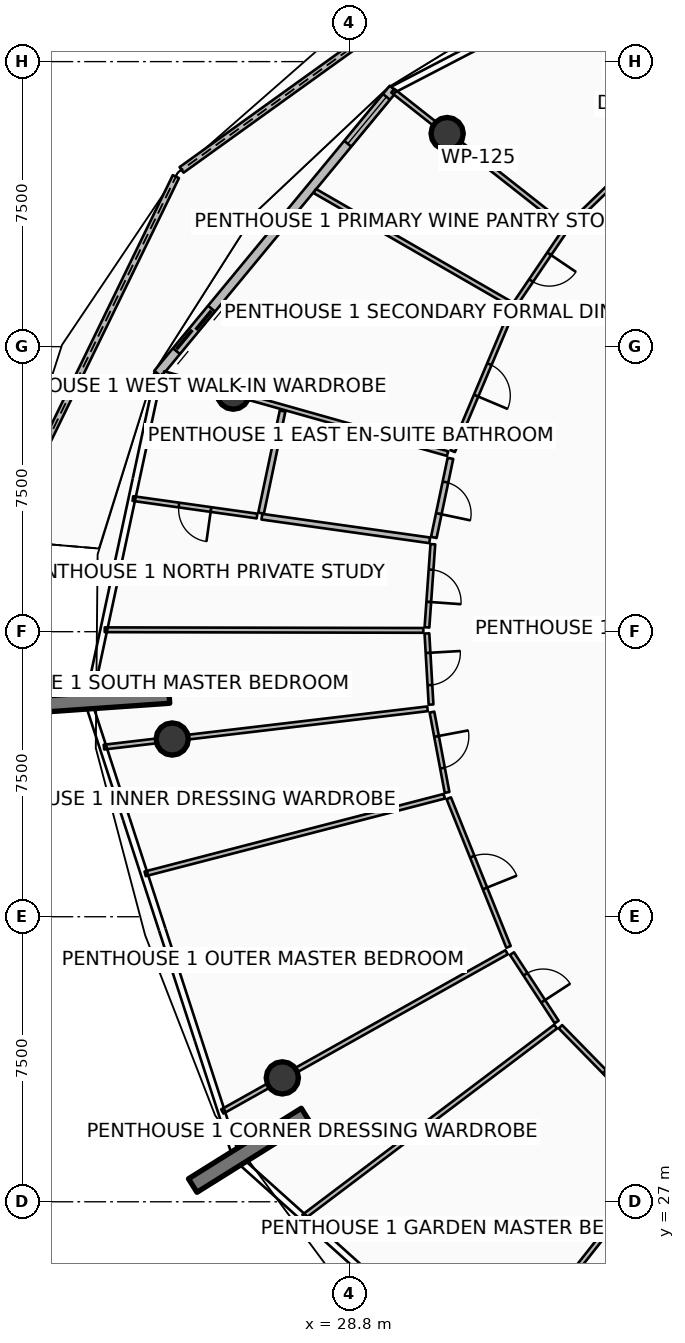
"""IFC4 building model, lengths in metres.
Left out: names, types, materials, properties, quantities, classifications, styles, units other than length and angle.
Written with IfcOpenShell. Run it as: python <this file> out.ifc"""

import sys

from ifc_helpers import new_model, si_unit, direction, frame, frame_2d, origin, origin_2d, place, context, subcontext, project, spatial, polyline, rectangle, circle, outline, extrude, element, fill, save


model = new_model("IFC4")
c1 = context("Model", 3, precision=1e-05, world=origin(), true_north=direction((0.0, 1.0)))
c2 = subcontext(c1, "Body", "Model", "MODEL_VIEW")
j1 = project(units=[si_unit("LENGTHUNIT", "METRE"), si_unit("PLANEANGLEUNIT", "RADIAN")], contexts=[c1])
p1 = place(None, origin())
s1 = spatial("IfcSite", under=j1, at=p1, CompositionType="ELEMENT")
p2 = place(p1, origin())
s2 = spatial("IfcBuilding", under=s1, at=p2, CompositionType="ELEMENT")
p3 = place(p2, frame((0.0, 0.0, 322.1)))
s3 = spatial("IfcBuildingStorey", under=s2, at=p3, CompositionType="ELEMENT", Elevation=322.1)
for number, where, z_axis, x_axis in (
    (1, (24.059, 40.326, 0.0), (0.0, 0.0, 1.0), (-0.998, -0.07, 0.0)),
    (2, (27.647, 29.282, 0.0), (0.0, 0.0, 1.0), (-0.848, -0.53, 0.0)),
):
    element("IfcWall", number, at=place(p3, frame(where, z_axis=z_axis, x_axis=x_axis)), inside=s3, PredefinedType="SOLIDWALL", context=c2, shape_type="SweptSolid", body=[
        extrude(rectangle(XDim=3.5, YDim=0.42, at=frame_2d((1.75, 0.0))), origin(), (0.0, 0.0, 1.0), 4.2),
    ])
for number, where, z_axis, x_axis in (
    (3, (31.374, 55.107, 0.0), (0.0, 0.0, 1.0), (1.0, 0.0, 0.0)),
    (4, (25.744, 48.277, 0.0), (0.0, 0.0, 1.0), (1.0, 0.0, 0.0)),
    (5, (24.14, 39.176, 0.0), (0.0, 0.0, 1.0), (1.0, 0.0, 0.0)),
    (6, (27.037, 30.26, 0.0), (0.0, 0.0, 1.0), (1.0, 0.0, 0.0)),
):
    element("IfcColumn", number, at=place(p3, frame(where, z_axis=z_axis, x_axis=x_axis)), inside=s3, PredefinedType="COLUMN", context=c2, shape_type="SweptSolid", body=[
        extrude(circle(Radius=0.425, at=origin_2d()), origin(), (0.0, 0.0, 1.0), 3.94),
    ])
p4 = place(p3, frame((32.469, 59.961, 0.0), z_axis=(0.0, 0.0, 1.0), x_axis=(-0.812019730163, -0.583629983659, 0.0)))
e7 = element("IfcWall", 7, at=p4, inside=s3, PredefinedType="PARAPET", context=c2, shape_type="SweptSolid", body=[
    extrude(outline(polyline([(0.0, 0.0), (9.954, 0.0), (9.954, 1.632), (4.977, 1.418), (0.0, 1.233), (0.0, 0.0)])), frame((0.0, 0.09, 0.0), z_axis=(0.0, -1.0, 0.0), x_axis=(1.0, 0.0, 0.0)), (0.0, 0.0, 1.0), 0.18),
])
p5 = place(p3, frame((24.236, 53.974, 0.0), z_axis=(0.0, 0.0, 1.0), x_axis=(-0.437628769895, -0.899155748333, 0.0)))
e8 = element("IfcWall", 8, at=p5, inside=s3, PredefinedType="PARAPET", context=c2, shape_type="SweptSolid", body=[
    extrude(outline(polyline([(0.0, 0.0), (10.635, 0.0), (10.635, 1.86), (5.317, 1.798), (0.0, 1.632), (0.0, 0.0)])), frame((0.0, 0.09, 0.0), z_axis=(0.0, -1.0, 0.0), x_axis=(1.0, 0.0, 0.0)), (0.0, 0.0, 1.0), 0.18),
])
p6 = place(p3, frame((29.955, 56.289, 0.0), z_axis=(0.0, 0.0, 1.0), x_axis=(-0.636803612721, -0.771026042897, 0.0)))
e9 = element("IfcWall", 9, at=p6, inside=s3, PredefinedType="SOLIDWALL", context=c2, shape_type="SweptSolid", body=[
    extrude(rectangle(XDim=9.728, YDim=0.24, at=frame_2d((4.864, 0.0))), origin(), (0.0, 0.0, 1.0), 2.89),
])
p7 = place(p6, frame((7.508, 0.0, 0.0)))
e10 = element("IfcOpeningElement", 10, at=p7, cuts=e9, PredefinedType="OPENING", context=c2, shape_type="SweptSolid", body=[
    extrude(rectangle(XDim=1.45, YDim=2.15, at=frame_2d((0.725, 1.075))), frame((0.0, 0.13, 0.0), z_axis=(0.0, -1.0, 0.0), x_axis=(1.0, 0.0, 0.0)), (0.0, 0.0, 1.0), 0.26),
])
p8 = place(p6, frame((0.28, 0.0, 0.65)))
e11 = element("IfcOpeningElement", 11, at=p8, cuts=e9, PredefinedType="OPENING", context=c2, shape_type="SweptSolid", body=[
    extrude(rectangle(XDim=1.6, YDim=1.5, at=frame_2d((0.8, 0.75))), frame((0.0, 0.13, 0.0), z_axis=(0.0, -1.0, 0.0), x_axis=(1.0, 0.0, 0.0)), (0.0, 0.0, 1.0), 0.26),
])
p9 = place(p3, frame((37.76, 55.886, 0.0), z_axis=(0.0, 0.0, 1.0), x_axis=(-0.593476725003, 0.804851152002, 0.0)))
e12 = element("IfcWall", 12, at=p9, inside=s3, PredefinedType="PARTITIONING", context=c2, shape_type="SweptSolid", body=[
    extrude(rectangle(XDim=3.958, YDim=0.15, at=frame_2d((1.979, 0.0))), origin(), (0.0, 0.0, 1.0), 3.38),
])
p10 = place(p3, frame((37.749, 55.751, 0.0), z_axis=(0.0, 0.0, 1.0), x_axis=(-0.718380815069, -0.695650058967, 0.0)))
e13 = element("IfcWall", 13, at=p10, inside=s3, PredefinedType="PARTITIONING", context=c2, shape_type="SweptSolid", body=[
    extrude(rectangle(XDim=4.393, YDim=0.125, at=frame_2d((2.196, 0.0))), origin(), (0.0, 0.0, 1.0), 3.38),
])
p11 = place(p10, frame((1.746, 0.0, 0.0)))
e14 = element("IfcOpeningElement", 14, at=p11, cuts=e13, PredefinedType="OPENING", context=c2, shape_type="SweptSolid", body=[
    extrude(rectangle(XDim=0.9, YDim=2.08, at=frame_2d((0.45, 1.04))), frame((0.0, 0.073, 0.0), z_axis=(0.0, -1.0, 0.0), x_axis=(1.0, 0.0, 0.0)), (0.0, 0.0, 1.0), 0.145),
])
p12 = place(p3, frame((34.443, 52.688, 0.0), z_axis=(0.0, 0.0, 1.0), x_axis=(-0.785329715116, 0.61907773224, 0.0)))
e15 = element("IfcWall", 15, at=p12, inside=s3, PredefinedType="PARTITIONING", context=c2, shape_type="SweptSolid", body=[
    extrude(rectangle(XDim=5.73, YDim=0.125, at=frame_2d((2.865, 0.0))), origin(), (0.0, 0.0, 1.0), 3.38),
])
p13 = place(p3, frame((33.054, 50.619, 0.0), z_axis=(0.0, 0.0, 1.0), x_axis=(-0.86627763932, 0.499562860524, 0.0)))
e16 = element("IfcWall", 16, at=p13, inside=s3, PredefinedType="PARTITIONING", context=c2, shape_type="SweptSolid", body=[
    extrude(rectangle(XDim=5.96, YDim=0.125, at=frame_2d((2.98, 0.0))), origin(), (0.0, 0.0, 1.0), 3.38),
])
p14 = place(p3, frame((34.466, 52.543, 0.0), z_axis=(0.0, 0.0, 1.0), x_axis=(-0.560789421623, -0.827958467917, 0.0)))
e17 = element("IfcWall", 17, at=p14, inside=s3, PredefinedType="PARTITIONING", context=c2, shape_type="SweptSolid", body=[
    extrude(rectangle(XDim=2.298, YDim=0.125, at=frame_2d((1.149, 0.0))), origin(), (0.0, 0.0, 1.0), 3.38),
])
p15 = place(p14, frame((0.724, 0.0, 0.0)))
e18 = element("IfcOpeningElement", 18, at=p15, cuts=e17, PredefinedType="OPENING", context=c2, shape_type="SweptSolid", body=[
    extrude(rectangle(XDim=0.85, YDim=2.06, at=frame_2d((0.425, 1.03))), frame((0.0, 0.073, 0.0), z_axis=(0.0, -1.0, 0.0), x_axis=(1.0, 0.0, 0.0)), (0.0, 0.0, 1.0), 0.145),
])
p16 = place(p3, frame((33.101, 50.5, 0.0), z_axis=(0.0, 0.0, 1.0), x_axis=(-0.388459336045, -0.921465867105, 0.0)))
e19 = element("IfcWall", 19, at=p16, inside=s3, PredefinedType="PARTITIONING", context=c2, shape_type="SweptSolid", body=[
    extrude(rectangle(XDim=4.069, YDim=0.125, at=frame_2d((2.034, 0.0))), origin(), (0.0, 0.0, 1.0), 3.38),
])
p17 = place(p16, frame((1.584, 0.0, 0.0)))
e20 = element("IfcOpeningElement", 20, at=p17, cuts=e19, PredefinedType="OPENING", context=c2, shape_type="SweptSolid", body=[
    extrude(rectangle(XDim=0.9, YDim=2.08, at=frame_2d((0.45, 1.04))), frame((0.0, 0.073, 0.0), z_axis=(0.0, -1.0, 0.0), x_axis=(1.0, 0.0, 0.0)), (0.0, 0.0, 1.0), 0.145),
])
p18 = place(p3, frame((31.385, 46.686, 0.0), z_axis=(0.0, 0.0, 1.0), x_axis=(-0.962455784847, 0.271438505401, 0.0)))
e21 = element("IfcWall", 21, at=p18, inside=s3, PredefinedType="PARTITIONING", context=c2, shape_type="SweptSolid", body=[
    extrude(rectangle(XDim=7.764, YDim=0.125, at=frame_2d((3.882, 0.0))), origin(), (0.0, 0.0, 1.0), 3.38),
])
p19 = place(p3, frame((31.461, 46.561, 0.0), z_axis=(0.0, 0.0, 1.0), x_axis=(-0.20584268828, -0.978585094758, 0.0)))
e22 = element("IfcWall", 22, at=p19, inside=s3, PredefinedType="PARTITIONING", context=c2, shape_type="SweptSolid", body=[
    extrude(rectangle(XDim=2.127, YDim=0.15, at=frame_2d((1.063, 0.0))), origin(), (0.0, 0.0, 1.0), 3.38),
])
p20 = place(p19, frame((0.638, 0.0, 0.0)))
e23 = element("IfcOpeningElement", 23, at=p20, cuts=e22, PredefinedType="OPENING", context=c2, shape_type="SweptSolid", body=[
    extrude(rectangle(XDim=0.85, YDim=2.06, at=frame_2d((0.425, 1.03))), frame((0.0, 0.085, 0.0), z_axis=(0.0, -1.0, 0.0), x_axis=(1.0, 0.0, 0.0)), (0.0, 0.0, 1.0), 0.17),
])
p21 = place(p3, frame((27.043, 47.807, 0.0), z_axis=(0.0, 0.0, 1.0), x_axis=(-0.205902945386, -0.978572417903, 0.0)))
e24 = element("IfcWall", 24, at=p21, inside=s3, PredefinedType="PARTITIONING", context=c2, shape_type="SweptSolid", body=[
    extrude(rectangle(XDim=2.746, YDim=0.15, at=frame_2d((1.373, 0.0))), origin(), (0.0, 0.0, 1.0), 3.38),
])
p22 = place(p3, frame((30.915, 44.404, 0.0), z_axis=(0.0, 0.0, 1.0), x_axis=(-0.990240767804, 0.139367219172, 0.0)))
e25 = element("IfcWall", 25, at=p22, inside=s3, PredefinedType="PARTITIONING", context=c2, shape_type="SweptSolid", body=[
    extrude(rectangle(XDim=4.46, YDim=0.15, at=frame_2d((2.23, 0.0))), origin(), (0.0, 0.0, 1.0), 3.38),
])
p23 = place(p3, frame((26.37, 45.044, 0.0), z_axis=(0.0, 0.0, 1.0), x_axis=(-0.990243492516, 0.139347858002, 0.0)))
e26 = element("IfcWall", 26, at=p23, inside=s3, PredefinedType="PARTITIONING", context=c2, shape_type="SweptSolid", body=[
    extrude(rectangle(XDim=3.297, YDim=0.125, at=frame_2d((1.649, 0.0))), origin(), (0.0, 0.0, 1.0), 3.38),
])
p24 = place(p23, frame((1.224, 0.0, 0.0)))
e27 = element("IfcOpeningElement", 27, at=p24, cuts=e26, PredefinedType="OPENING", context=c2, shape_type="SweptSolid", body=[
    extrude(rectangle(XDim=0.85, YDim=2.06, at=frame_2d((0.425, 1.03))), frame((0.0, 0.073, 0.0), z_axis=(0.0, -1.0, 0.0), x_axis=(1.0, 0.0, 0.0)), (0.0, 0.0, 1.0), 0.145),
])
p25 = place(p3, frame((30.747, 42.034, 0.0), z_axis=(0.0, 0.0, 1.0), x_axis=(-0.999998039071, 0.001980367145, 0.0)))
e28 = element("IfcWall", 28, at=p25, inside=s3, PredefinedType="PARTITIONING", context=c2, shape_type="SweptSolid", body=[
    extrude(rectangle(XDim=8.383, YDim=0.125, at=frame_2d((4.191, 0.0))), origin(), (0.0, 0.0, 1.0), 3.38),
])
p26 = place(p3, frame((30.998, 44.302, 0.0), z_axis=(0.0, 0.0, 1.0), x_axis=(-0.070788273512, -0.997491363538, 0.0)))
e29 = element("IfcWall", 29, at=p26, inside=s3, PredefinedType="PARTITIONING", context=c2, shape_type="SweptSolid", body=[
    extrude(rectangle(XDim=2.194, YDim=0.125, at=frame_2d((1.097, 0.0))), origin(), (0.0, 0.0, 1.0), 3.38),
])
p27 = place(p26, frame((0.672, 0.0, 0.0)))
e30 = element("IfcOpeningElement", 30, at=p27, cuts=e29, PredefinedType="OPENING", context=c2, shape_type="SweptSolid", body=[
    extrude(rectangle(XDim=0.85, YDim=2.06, at=frame_2d((0.425, 1.03))), frame((0.0, 0.073, 0.0), z_axis=(0.0, -1.0, 0.0), x_axis=(1.0, 0.0, 0.0)), (0.0, 0.0, 1.0), 0.145),
])
p28 = place(p3, frame((30.842, 41.954, 0.0), z_axis=(0.0, 0.0, 1.0), x_axis=(0.057950971365, -0.998319430302, 0.0)))
e31 = element("IfcWall", 31, at=p28, inside=s3, PredefinedType="PARTITIONING", context=c2, shape_type="SweptSolid", body=[
    extrude(rectangle(XDim=1.875, YDim=0.125, at=frame_2d((0.938, 0.0))), origin(), (0.0, 0.0, 1.0), 3.38),
])
p29 = place(p28, frame((0.512, 0.0, 0.0)))
e32 = element("IfcOpeningElement", 32, at=p29, cuts=e31, PredefinedType="OPENING", context=c2, shape_type="SweptSolid", body=[
    extrude(rectangle(XDim=0.85, YDim=2.06, at=frame_2d((0.425, 1.03))), frame((0.0, 0.073, 0.0), z_axis=(0.0, -1.0, 0.0), x_axis=(1.0, 0.0, 0.0)), (0.0, 0.0, 1.0), 0.145),
])
p30 = place(p3, frame((30.857, 39.971, 0.0), z_axis=(0.0, 0.0, 1.0), x_axis=(-0.993069304007, -0.117530240533, 0.0)))
e33 = element("IfcWall", 33, at=p30, inside=s3, PredefinedType="PARTITIONING", context=c2, shape_type="SweptSolid", body=[
    extrude(rectangle(XDim=8.573, YDim=0.125, at=frame_2d((4.286, 0.0))), origin(), (0.0, 0.0, 1.0), 3.38),
])
p31 = place(p3, frame((31.299, 37.67, 0.0), z_axis=(0.0, 0.0, 1.0), x_axis=(-0.967993656755, -0.250974661037, 0.0)))
e34 = element("IfcWall", 34, at=p31, inside=s3, PredefinedType="PARTITIONING", context=c2, shape_type="SweptSolid", body=[
    extrude(rectangle(XDim=8.132, YDim=0.125, at=frame_2d((4.066, 0.0))), origin(), (0.0, 0.0, 1.0), 3.38),
])
p32 = place(p3, frame((30.975, 39.885, 0.0), z_axis=(0.0, 0.0, 1.0), x_axis=(0.184617579239, -0.982810434131, 0.0)))
e35 = element("IfcWall", 35, at=p32, inside=s3, PredefinedType="PARTITIONING", context=c2, shape_type="SweptSolid", body=[
    extrude(rectangle(XDim=2.15, YDim=0.125, at=frame_2d((1.075, 0.0))), origin(), (0.0, 0.0, 1.0), 3.38),
])
p33 = place(p32, frame((0.65, 0.0, 0.0)))
e36 = element("IfcOpeningElement", 36, at=p33, cuts=e35, PredefinedType="OPENING", context=c2, shape_type="SweptSolid", body=[
    extrude(rectangle(XDim=0.85, YDim=2.06, at=frame_2d((0.425, 1.03))), frame((0.0, 0.073, 0.0), z_axis=(0.0, -1.0, 0.0), x_axis=(1.0, 0.0, 0.0)), (0.0, 0.0, 1.0), 0.145),
])
p34 = place(p3, frame((31.416, 37.618, 0.0), z_axis=(0.0, 0.0, 1.0), x_axis=(0.37287786912, -0.927880431263, 0.0)))
e37 = element("IfcWall", 37, at=p34, inside=s3, PredefinedType="PARTITIONING", context=c2, shape_type="SweptSolid", body=[
    extrude(rectangle(XDim=4.216, YDim=0.125, at=frame_2d((2.108, 0.0))), origin(), (0.0, 0.0, 1.0), 3.38),
])
p35 = place(p34, frame((1.658, 0.0, 0.0)))
e38 = element("IfcOpeningElement", 38, at=p35, cuts=e37, PredefinedType="OPENING", context=c2, shape_type="SweptSolid", body=[
    extrude(rectangle(XDim=0.9, YDim=2.08, at=frame_2d((0.45, 1.04))), frame((0.0, 0.073, 0.0), z_axis=(0.0, -1.0, 0.0), x_axis=(1.0, 0.0, 0.0)), (0.0, 0.0, 1.0), 0.145),
])
p36 = place(p3, frame((32.938, 33.565, 0.0), z_axis=(0.0, 0.0, 1.0), x_axis=(-0.87250261652, -0.488609439293, 0.0)))
e39 = element("IfcWall", 39, at=p36, inside=s3, PredefinedType="PARTITIONING", context=c2, shape_type="SweptSolid", body=[
    extrude(rectangle(XDim=8.573, YDim=0.125, at=frame_2d((4.286, 0.0))), origin(), (0.0, 0.0, 1.0), 3.38),
])
p37 = place(p3, frame((37.312, 28.443, 0.0), z_axis=(0.0, 0.0, 1.0), x_axis=(-0.619079427556, -0.78532837869, 0.0)))
e40 = element("IfcWall", 40, at=p37, inside=s3, PredefinedType="PARTITIONING", context=c2, shape_type="SweptSolid", body=[
    extrude(rectangle(XDim=7.864, YDim=0.125, at=frame_2d((3.932, 0.0))), origin(), (0.0, 0.0, 1.0), 3.38),
])
p38 = place(p3, frame((34.228, 31.608, 0.0), z_axis=(0.0, 0.0, 1.0), x_axis=(-0.798277484709, -0.602289845014, 0.0)))
e41 = element("IfcWall", 41, at=p38, inside=s3, PredefinedType="PARTITIONING", context=c2, shape_type="SweptSolid", body=[
    extrude(rectangle(XDim=8.299, YDim=0.125, at=frame_2d((4.149, 0.0))), origin(), (0.0, 0.0, 1.0), 3.38),
])
p39 = place(p3, frame((33.08, 33.53, 0.0), z_axis=(0.0, 0.0, 1.0), x_axis=(0.546735291737, -0.837305512205, 0.0)))
e42 = element("IfcWall", 42, at=p39, inside=s3, PredefinedType="PARTITIONING", context=c2, shape_type="SweptSolid", body=[
    extrude(rectangle(XDim=2.15, YDim=0.125, at=frame_2d((1.075, 0.0))), origin(), (0.0, 0.0, 1.0), 3.38),
])
p40 = place(p39, frame((0.65, 0.0, 0.0)))
e43 = element("IfcOpeningElement", 43, at=p40, cuts=e42, PredefinedType="OPENING", context=c2, shape_type="SweptSolid", body=[
    extrude(rectangle(XDim=0.85, YDim=2.06, at=frame_2d((0.425, 1.03))), frame((0.0, 0.073, 0.0), z_axis=(0.0, -1.0, 0.0), x_axis=(1.0, 0.0, 0.0)), (0.0, 0.0, 1.0), 0.145),
])
p41 = place(p3, frame((34.355, 31.605, 0.0), z_axis=(0.0, 0.0, 1.0), x_axis=(0.699567507915, -0.714566513258, 0.0)))
e44 = element("IfcWall", 44, at=p41, inside=s3, PredefinedType="PARTITIONING", context=c2, shape_type="SweptSolid", body=[
    extrude(rectangle(XDim=4.216, YDim=0.125, at=frame_2d((2.108, 0.0))), origin(), (0.0, 0.0, 1.0), 3.38),
])
p42 = place(p41, frame((1.658, 0.0, 0.0)))
e45 = element("IfcOpeningElement", 45, at=p42, cuts=e44, PredefinedType="OPENING", context=c2, shape_type="SweptSolid", body=[
    extrude(rectangle(XDim=0.9, YDim=2.08, at=frame_2d((0.45, 1.04))), frame((0.0, 0.073, 0.0), z_axis=(0.0, -1.0, 0.0), x_axis=(1.0, 0.0, 0.0)), (0.0, 0.0, 1.0), 0.145),
])
p43 = place(p7, origin())
e46 = element("IfcDoor", 46, at=p43, inside=s3, OperationType="DOUBLE_DOOR_SLIDING", PredefinedType="DOOR", context=c2, shape_type="SweptSolid", body=[
    extrude(rectangle(XDim=1.45, YDim=2.15, at=frame_2d((0.725, 1.075))), frame((0.0, 0.025, 0.0), z_axis=(0.0, -1.0, 0.0), x_axis=(1.0, 0.0, 0.0)), (0.0, 0.0, 1.0), 0.05),
])
fill(e10, e46)
p44 = place(p8, origin())
e47 = element("IfcWindow", 47, at=p44, inside=s3, PartitioningType="SINGLE_PANEL", PredefinedType="WINDOW", context=c2, shape_type="SweptSolid", body=[
    extrude(rectangle(XDim=1.6, YDim=1.5, at=frame_2d((0.8, 0.75))), frame((0.0, 0.03, 0.0), z_axis=(0.0, -1.0, 0.0), x_axis=(1.0, 0.0, 0.0)), (0.0, 0.0, 1.0), 0.06),
])
fill(e11, e47)
p45 = place(p15, origin())
e48 = element("IfcDoor", 48, at=p45, inside=s3, OperationType="SINGLE_SWING_LEFT", PredefinedType="DOOR", context=c2, shape_type="SweptSolid", body=[
    extrude(rectangle(XDim=0.85, YDim=2.06, at=frame_2d((0.425, 1.03))), frame((0.0, 0.025, 0.0), z_axis=(0.0, -1.0, 0.0), x_axis=(1.0, 0.0, 0.0)), (0.0, 0.0, 1.0), 0.05),
])
fill(e18, e48)
p46 = place(p17, origin())
e49 = element("IfcDoor", 49, at=p46, inside=s3, OperationType="SINGLE_SWING_RIGHT", PredefinedType="DOOR", context=c2, shape_type="SweptSolid", body=[
    extrude(rectangle(XDim=0.9, YDim=2.08, at=frame_2d((0.45, 1.04))), frame((0.0, 0.025, 0.0), z_axis=(0.0, -1.0, 0.0), x_axis=(1.0, 0.0, 0.0)), (0.0, 0.0, 1.0), 0.05),
])
fill(e20, e49)
p47 = place(p20, origin())
e50 = element("IfcDoor", 50, at=p47, inside=s3, OperationType="SINGLE_SWING_RIGHT", PredefinedType="DOOR", context=c2, shape_type="SweptSolid", body=[
    extrude(rectangle(XDim=0.85, YDim=2.06, at=frame_2d((0.425, 1.03))), frame((0.0, 0.025, 0.0), z_axis=(0.0, -1.0, 0.0), x_axis=(1.0, 0.0, 0.0)), (0.0, 0.0, 1.0), 0.05),
])
fill(e23, e50)
p48 = place(p24, origin())
e51 = element("IfcDoor", 51, at=p48, inside=s3, OperationType="SINGLE_SWING_LEFT", PredefinedType="DOOR", context=c2, shape_type="SweptSolid", body=[
    extrude(rectangle(XDim=0.85, YDim=2.06, at=frame_2d((0.425, 1.03))), frame((0.0, 0.025, 0.0), z_axis=(0.0, -1.0, 0.0), x_axis=(1.0, 0.0, 0.0)), (0.0, 0.0, 1.0), 0.05),
])
fill(e27, e51)
p49 = place(p27, origin())
e52 = element("IfcDoor", 52, at=p49, inside=s3, OperationType="SINGLE_SWING_RIGHT", PredefinedType="DOOR", context=c2, shape_type="SweptSolid", body=[
    extrude(rectangle(XDim=0.85, YDim=2.06, at=frame_2d((0.425, 1.03))), frame((0.0, 0.025, 0.0), z_axis=(0.0, -1.0, 0.0), x_axis=(1.0, 0.0, 0.0)), (0.0, 0.0, 1.0), 0.05),
])
fill(e30, e52)
p50 = place(p29, origin())
e53 = element("IfcDoor", 53, at=p50, inside=s3, OperationType="SINGLE_SWING_LEFT", PredefinedType="DOOR", context=c2, shape_type="SweptSolid", body=[
    extrude(rectangle(XDim=0.85, YDim=2.06, at=frame_2d((0.425, 1.03))), frame((0.0, 0.025, 0.0), z_axis=(0.0, -1.0, 0.0), x_axis=(1.0, 0.0, 0.0)), (0.0, 0.0, 1.0), 0.05),
])
fill(e32, e53)
p51 = place(p33, origin())
e54 = element("IfcDoor", 54, at=p51, inside=s3, OperationType="SINGLE_SWING_LEFT", PredefinedType="DOOR", context=c2, shape_type="SweptSolid", body=[
    extrude(rectangle(XDim=0.85, YDim=2.06, at=frame_2d((0.425, 1.03))), frame((0.0, 0.025, 0.0), z_axis=(0.0, -1.0, 0.0), x_axis=(1.0, 0.0, 0.0)), (0.0, 0.0, 1.0), 0.05),
])
fill(e36, e54)
p52 = place(p35, origin())
e55 = element("IfcDoor", 55, at=p52, inside=s3, OperationType="SINGLE_SWING_RIGHT", PredefinedType="DOOR", context=c2, shape_type="SweptSolid", body=[
    extrude(rectangle(XDim=0.9, YDim=2.08, at=frame_2d((0.45, 1.04))), frame((0.0, 0.025, 0.0), z_axis=(0.0, -1.0, 0.0), x_axis=(1.0, 0.0, 0.0)), (0.0, 0.0, 1.0), 0.05),
])
fill(e38, e55)
p53 = place(p40, origin())
e56 = element("IfcDoor", 56, at=p53, inside=s3, OperationType="SINGLE_SWING_RIGHT", PredefinedType="DOOR", context=c2, shape_type="SweptSolid", body=[
    extrude(rectangle(XDim=0.85, YDim=2.06, at=frame_2d((0.425, 1.03))), frame((0.0, 0.025, 0.0), z_axis=(0.0, -1.0, 0.0), x_axis=(1.0, 0.0, 0.0)), (0.0, 0.0, 1.0), 0.05),
])
fill(e43, e56)
p54 = place(p42, origin())
e57 = element("IfcDoor", 57, at=p54, inside=s3, OperationType="SINGLE_SWING_LEFT", PredefinedType="DOOR", context=c2, shape_type="SweptSolid", body=[
    extrude(rectangle(XDim=0.9, YDim=2.08, at=frame_2d((0.45, 1.04))), frame((0.0, 0.025, 0.0), z_axis=(0.0, -1.0, 0.0), x_axis=(1.0, 0.0, 0.0)), (0.0, 0.0, 1.0), 0.05),
])
fill(e45, e57)
save(model, sys.argv[1])
